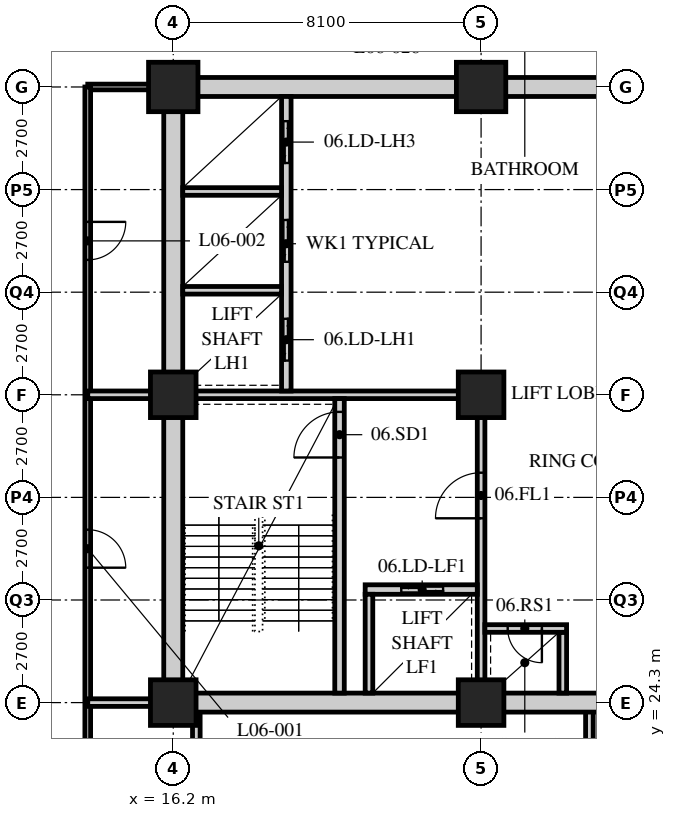
"""IFC4 building model, lengths in metres.
Left out: names, types, materials, properties, quantities, classifications, styles, units other than length and angle.
Written with IfcOpenShell. Run it as: python <this file> out.ifc"""

import sys

from ifc_helpers import new_model, si_unit, direction, frame, frame_2d, origin, origin_2d, place, context, subcontext, project, spatial, rectangle, hollow_rectangle, extrude, element, fill, save


model = new_model("IFC4")
c1 = context("Model", 3, precision=1e-05, world=origin(), true_north=direction((0.0, 1.0)))
c2 = subcontext(c1, "Body", "Model", "MODEL_VIEW")
j1 = project(units=[si_unit("LENGTHUNIT", "METRE"), si_unit("PLANEANGLEUNIT", "RADIAN")], contexts=[c1])
p1 = place(None, origin())
s1 = spatial("IfcSite", under=j1, at=p1, CompositionType="ELEMENT")
p2 = place(p1, origin())
s2 = spatial("IfcBuilding", under=s1, at=p2, CompositionType="ELEMENT")
p3 = place(p2, frame((0.0, 0.0, 33.0)))
s3 = spatial("IfcBuildingStorey", under=s2, at=p3, CompositionType="ELEMENT", Elevation=33.0)
for number, where, z_axis, x_axis in (
    (1, (16.2, 24.3, 0.0), (0.0, 0.0, 1.0), (1.0, 0.0, 0.0)),
    (2, (16.2, 32.4, 0.0), (0.0, 0.0, 1.0), (1.0, 0.0, 0.0)),
):
    element("IfcColumn", number, at=place(p3, frame(where, z_axis=z_axis, x_axis=x_axis)), inside=s3, PredefinedType="COLUMN", context=c2, shape_type="SweptSolid", body=[
        extrude(hollow_rectangle(XDim=1.2, YDim=1.2, WallThickness=0.12, at=origin_2d()), origin(), (0.0, 0.0, 1.0), 3.4),
    ])
p4 = place(p3, frame((16.2, 40.5, 0.0), z_axis=(0.0, 0.0, 1.0), x_axis=(1.0, 0.0, 0.0)))
e3 = element("IfcColumn", 3, at=p4, inside=s3, PredefinedType="COLUMN", context=c2, shape_type="SweptSolid", body=[
    extrude(hollow_rectangle(XDim=1.3, YDim=1.3, WallThickness=0.13, at=origin_2d()), origin(), (0.0, 0.0, 1.0), 3.4),
])
for number, where, z_axis, x_axis in (
    (4, (24.3, 24.3, 0.0), (0.0, 0.0, 1.0), (1.0, 0.0, 0.0)),
    (5, (24.3, 32.4, 0.0), (0.0, 0.0, 1.0), (1.0, 0.0, 0.0)),
):
    element("IfcColumn", number, at=place(p3, frame(where, z_axis=z_axis, x_axis=x_axis)), inside=s3, PredefinedType="COLUMN", context=c2, shape_type="SweptSolid", body=[
        extrude(hollow_rectangle(XDim=1.2, YDim=1.2, WallThickness=0.12, at=origin_2d()), origin(), (0.0, 0.0, 1.0), 3.4),
    ])
p5 = place(p3, frame((24.3, 40.5, 0.0), z_axis=(0.0, 0.0, 1.0), x_axis=(1.0, 0.0, 0.0)))
e6 = element("IfcColumn", 6, at=p5, inside=s3, PredefinedType="COLUMN", context=c2, shape_type="SweptSolid", body=[
    extrude(hollow_rectangle(XDim=1.3, YDim=1.3, WallThickness=0.13, at=origin_2d()), origin(), (0.0, 0.0, 1.0), 3.4),
])
p6 = place(p3, frame((16.0, 40.5, 0.0), z_axis=(0.0, 0.0, 1.0), x_axis=(-1.0, 0.0, 0.0)))
e7 = element("IfcWall", 7, at=p6, inside=s3, PredefinedType="PARTITIONING", context=c2, shape_type="SweptSolid", body=[
    extrude(rectangle(XDim=2.05, YDim=0.15, at=frame_2d((1.025, 0.0))), origin(), (0.0, 0.0, 1.0), 2.578),
])
p7 = place(p3, frame((13.95, 40.5, 0.0), z_axis=(0.0, 0.0, 1.0), x_axis=(0.0, -1.0, 0.0)))
e8 = element("IfcWall", 8, at=p7, inside=s3, PredefinedType="PARTITIONING", context=c2, shape_type="SweptSolid", body=[
    extrude(rectangle(XDim=22.5, YDim=0.15, at=frame_2d((11.25, 0.0))), origin(), (0.0, 0.0, 1.0), 3.19),
])
p8 = place(p7, frame((11.65, 0.0, 0.0)))
e9 = element("IfcOpeningElement", 9, at=p8, cuts=e8, PredefinedType="OPENING", context=c2, shape_type="SweptSolid", body=[
    extrude(rectangle(XDim=1.0, YDim=2.1, at=frame_2d((0.5, 1.05))), frame((0.0, 0.085, 0.0), z_axis=(0.0, -1.0, 0.0), x_axis=(1.0, 0.0, 0.0)), (0.0, 0.0, 1.0), 0.17),
])
p9 = place(p7, frame((3.55, 0.0, 0.0)))
e10 = element("IfcOpeningElement", 10, at=p9, cuts=e8, PredefinedType="OPENING", context=c2, shape_type="SweptSolid", body=[
    extrude(rectangle(XDim=1.0, YDim=2.1, at=frame_2d((0.5, 1.05))), frame((0.0, 0.085, 0.0), z_axis=(0.0, -1.0, 0.0), x_axis=(1.0, 0.0, 0.0)), (0.0, 0.0, 1.0), 0.17),
])
p10 = place(p3, frame((13.95, 32.4, 0.0), z_axis=(0.0, 0.0, 1.0), x_axis=(1.0, 0.0, 0.0)))
e11 = element("IfcWall", 11, at=p10, inside=s3, PredefinedType="SOLIDWALL", context=c2, shape_type="SweptSolid", body=[
    extrude(rectangle(XDim=2.25, YDim=0.2, at=frame_2d((1.125, 0.0))), origin(), (0.0, 0.0, 1.0), 2.578),
])
for number, where, z_axis, x_axis in (
    (12, (16.807, 18.0, 0.0), (0.0, 0.0, 1.0), (0.0, 1.0, 0.0)),
    (13, (27.15, 18.0, 0.0), (0.0, 0.0, 1.0), (0.0, 1.0, 0.0)),
):
    element("IfcWall", number, at=place(p3, frame(where, z_axis=z_axis, x_axis=x_axis)), inside=s3, PredefinedType="SOLIDWALL", context=c2, shape_type="SweptSolid", body=[
        extrude(rectangle(XDim=6.3, YDim=0.2, at=frame_2d((3.15, 0.0))), origin(), (0.0, 0.0, 1.0), 3.19),
    ])
p11 = place(p3, frame((13.95, 24.3, 0.0), z_axis=(0.0, 0.0, 1.0), x_axis=(1.0, 0.0, 0.0)))
e14 = element("IfcWall", 14, at=p11, inside=s3, PredefinedType="SOLIDWALL", context=c2, shape_type="SweptSolid", body=[
    extrude(rectangle(XDim=2.25, YDim=0.2, at=frame_2d((1.125, 0.0))), origin(), (0.0, 0.0, 1.0), 2.578),
])
p12 = place(p3, frame((15.95, 24.3, 0.0), z_axis=(0.0, 0.0, 1.0), x_axis=(1.0, 0.0, 0.0)))
e15 = element("IfcWall", 15, at=p12, inside=s3, PredefinedType="SOLIDWALL", context=c2, shape_type="SweptSolid", body=[
    extrude(rectangle(XDim=24.8, YDim=0.5, at=frame_2d((12.4, 0.0))), origin(), (0.0, 0.0, 1.0), 2.54),
])
p13 = place(p12, frame((11.5, 0.0, 0.0)))
e16 = element("IfcOpeningElement", 16, at=p13, cuts=e15, PredefinedType="OPENING", context=c2, shape_type="SweptSolid", body=[
    extrude(rectangle(XDim=1.8, YDim=2.4, at=frame_2d((0.9, 1.2))), frame((0.0, 0.26, 0.0), z_axis=(0.0, -1.0, 0.0), x_axis=(1.0, 0.0, 0.0)), (0.0, 0.0, 1.0), 0.52),
])
p14 = place(p3, frame((15.95, 40.5, 0.0), z_axis=(0.0, 0.0, 1.0), x_axis=(1.0, 0.0, 0.0)))
e17 = element("IfcWall", 17, at=p14, inside=s3, PredefinedType="SOLIDWALL", context=c2, shape_type="SweptSolid", body=[
    extrude(rectangle(XDim=24.8, YDim=0.5, at=frame_2d((12.4, 0.0))), origin(), (0.0, 0.0, 1.0), 2.54),
])
p15 = place(p14, frame((11.5, 0.0, 0.0)))
e18 = element("IfcOpeningElement", 18, at=p15, cuts=e17, PredefinedType="OPENING", context=c2, shape_type="SweptSolid", body=[
    extrude(rectangle(XDim=1.8, YDim=2.4, at=frame_2d((0.9, 1.2))), frame((0.0, 0.26, 0.0), z_axis=(0.0, -1.0, 0.0), x_axis=(1.0, 0.0, 0.0)), (0.0, 0.0, 1.0), 0.52),
])
p16 = place(p3, frame((16.2, 24.55, 0.0), z_axis=(0.0, 0.0, 1.0), x_axis=(0.0, 1.0, 0.0)))
e19 = element("IfcWall", 19, at=p16, inside=s3, PredefinedType="SOLIDWALL", context=c2, shape_type="SweptSolid", body=[
    extrude(rectangle(XDim=15.7, YDim=0.5, at=frame_2d((7.85, 0.0))), origin(), (0.0, 0.0, 1.0), 2.578),
])
p17 = place(p3, frame((16.45, 32.4, 0.0), z_axis=(0.0, 0.0, 1.0), x_axis=(1.0, 0.0, 0.0)))
e20 = element("IfcWall", 20, at=p17, inside=s3, PredefinedType="SOLIDWALL", context=c2, shape_type="SweptSolid", body=[
    extrude(rectangle(XDim=7.95, YDim=0.2, at=frame_2d((3.975, 0.0))), origin(), (0.0, 0.0, 1.0), 2.578),
])
p18 = place(p3, frame((24.3, 24.55, 0.0), z_axis=(0.0, 0.0, 1.0), x_axis=(0.0, 1.0, 0.0)))
e21 = element("IfcWall", 21, at=p18, inside=s3, PredefinedType="SOLIDWALL", context=c2, shape_type="SweptSolid", body=[
    extrude(rectangle(XDim=7.75, YDim=0.2, at=frame_2d((3.875, 0.0))), origin(), (0.0, 0.0, 1.0), 2.578),
])
p19 = place(p18, frame((4.6, 0.0, 0.0)))
e22 = element("IfcOpeningElement", 22, at=p19, cuts=e21, PredefinedType="OPENING", context=c2, shape_type="SweptSolid", body=[
    extrude(rectangle(XDim=1.2, YDim=2.1, at=frame_2d((0.6, 1.05))), frame((0.0, 0.11, 0.0), z_axis=(0.0, -1.0, 0.0), x_axis=(1.0, 0.0, 0.0)), (0.0, 0.0, 1.0), 0.22),
])
p20 = place(p3, frame((20.575, 24.55, 0.0), z_axis=(0.0, 0.0, 1.0), x_axis=(0.0, 1.0, 0.0)))
e23 = element("IfcWall", 23, at=p20, inside=s3, PredefinedType="SOLIDWALL", context=c2, shape_type="SweptSolid", body=[
    extrude(rectangle(XDim=7.75, YDim=0.25, at=frame_2d((3.875, 0.0))), origin(), (0.0, 0.0, 1.0), 3.19),
])
p21 = place(p20, frame((6.2, 0.0, 0.0)))
e24 = element("IfcOpeningElement", 24, at=p21, cuts=e23, PredefinedType="OPENING", context=c2, shape_type="SweptSolid", body=[
    extrude(rectangle(XDim=1.2, YDim=2.1, at=frame_2d((0.6, 1.05))), frame((0.0, 0.135, 0.0), z_axis=(0.0, -1.0, 0.0), x_axis=(1.0, 0.0, 0.0)), (0.0, 0.0, 1.0), 0.27),
])
p22 = place(p3, frame((21.25, 27.275, 0.0), z_axis=(0.0, 0.0, 1.0), x_axis=(1.0, 0.0, 0.0)))
e25 = element("IfcWall", 25, at=p22, inside=s3, PredefinedType="SOLIDWALL", context=c2, shape_type="SweptSolid", body=[
    extrude(rectangle(XDim=2.95, YDim=0.25, at=frame_2d((1.475, 0.0))), origin(), (0.0, 0.0, 1.0), 3.19),
])
p23 = place(p22, frame((0.95, 0.0, 0.0)))
e26 = element("IfcOpeningElement", 26, at=p23, cuts=e25, PredefinedType="OPENING", context=c2, shape_type="SweptSolid", body=[
    extrude(rectangle(XDim=1.1, YDim=2.4, at=frame_2d((0.55, 1.2))), frame((0.0, 0.135, 0.0), z_axis=(0.0, -1.0, 0.0), x_axis=(1.0, 0.0, 0.0)), (0.0, 0.0, 1.0), 0.27),
])
p24 = place(p3, frame((21.35, 24.55, 0.0), z_axis=(0.0, 0.0, 1.0), x_axis=(0.0, 1.0, 0.0)))
e27 = element("IfcWall", 27, at=p24, inside=s3, PredefinedType="SOLIDWALL", context=c2, shape_type="SweptSolid", body=[
    extrude(rectangle(XDim=2.6, YDim=0.2, at=frame_2d((1.3, 0.0))), origin(), (0.0, 0.0, 1.0), 3.19),
])
p25 = place(p3, frame((19.175, 32.5, 0.0), z_axis=(0.0, 0.0, 1.0), x_axis=(0.0, 1.0, 0.0)))
e28 = element("IfcWall", 28, at=p25, inside=s3, PredefinedType="SOLIDWALL", context=c2, shape_type="SweptSolid", body=[
    extrude(rectangle(XDim=7.75, YDim=0.25, at=frame_2d((3.875, 0.0))), origin(), (0.0, 0.0, 1.0), 3.19),
])
p26 = place(p25, frame((0.8, 0.0, 0.0)))
e29 = element("IfcOpeningElement", 29, at=p26, cuts=e28, PredefinedType="OPENING", context=c2, shape_type="SweptSolid", body=[
    extrude(rectangle(XDim=1.1, YDim=2.4, at=frame_2d((0.55, 1.2))), frame((0.0, 0.135, 0.0), z_axis=(0.0, -1.0, 0.0), x_axis=(1.0, 0.0, 0.0)), (0.0, 0.0, 1.0), 0.27),
])
p27 = place(p25, frame((3.4, 0.0, 0.0)))
e30 = element("IfcOpeningElement", 30, at=p27, cuts=e28, PredefinedType="OPENING", context=c2, shape_type="SweptSolid", body=[
    extrude(rectangle(XDim=1.1, YDim=2.4, at=frame_2d((0.55, 1.2))), frame((0.0, 0.135, 0.0), z_axis=(0.0, -1.0, 0.0), x_axis=(1.0, 0.0, 0.0)), (0.0, 0.0, 1.0), 0.27),
])
p28 = place(p25, frame((6.0, 0.0, 0.0)))
e31 = element("IfcOpeningElement", 31, at=p28, cuts=e28, PredefinedType="OPENING", context=c2, shape_type="SweptSolid", body=[
    extrude(rectangle(XDim=1.1, YDim=2.4, at=frame_2d((0.55, 1.2))), frame((0.0, 0.135, 0.0), z_axis=(0.0, -1.0, 0.0), x_axis=(1.0, 0.0, 0.0)), (0.0, 0.0, 1.0), 0.27),
])
for number, where, z_axis, x_axis in (
    (32, (16.45, 35.15, 0.0), (0.0, 0.0, 1.0), (1.0, 0.0, 0.0)),
    (33, (16.45, 37.75, 0.0), (0.0, 0.0, 1.0), (1.0, 0.0, 0.0)),
):
    element("IfcWall", number, at=place(p3, frame(where, z_axis=z_axis, x_axis=x_axis)), inside=s3, PredefinedType="SOLIDWALL", context=c2, shape_type="SweptSolid", body=[
        extrude(rectangle(XDim=2.6, YDim=0.2, at=frame_2d((1.3, 0.0))), origin(), (0.0, 0.0, 1.0), 3.19),
    ])
p29 = place(p3, frame((26.45, 24.55, 0.0), z_axis=(0.0, 0.0, 1.0), x_axis=(0.0, 1.0, 0.0)))
e34 = element("IfcWall", 34, at=p29, inside=s3, PredefinedType="SOLIDWALL", context=c2, shape_type="SweptSolid", body=[
    extrude(rectangle(XDim=1.6, YDim=0.2, at=frame_2d((0.8, 0.0))), origin(), (0.0, 0.0, 1.0), 3.19),
])
p30 = place(p3, frame((24.4, 26.25, 0.0), z_axis=(0.0, 0.0, 1.0), x_axis=(1.0, 0.0, 0.0)))
e35 = element("IfcWall", 35, at=p30, inside=s3, PredefinedType="SOLIDWALL", context=c2, shape_type="SweptSolid", body=[
    extrude(rectangle(XDim=2.15, YDim=0.2, at=frame_2d((1.075, 0.0))), origin(), (0.0, 0.0, 1.0), 3.19),
])
p31 = place(p30, frame((0.6, 0.0, 0.0)))
e36 = element("IfcOpeningElement", 36, at=p31, cuts=e35, PredefinedType="OPENING", context=c2, shape_type="SweptSolid", body=[
    extrude(rectangle(XDim=0.9, YDim=2.1, at=frame_2d((0.45, 1.05))), frame((0.0, 0.11, 0.0), z_axis=(0.0, -1.0, 0.0), x_axis=(1.0, 0.0, 0.0)), (0.0, 0.0, 1.0), 0.22),
])
p32 = place(p8, origin())
e37 = element("IfcDoor", 37, at=p32, inside=s3, OperationType="SINGLE_SWING_RIGHT", PredefinedType="DOOR", context=c2, shape_type="SweptSolid", body=[
    extrude(rectangle(XDim=1.0, YDim=2.1, at=frame_2d((0.5, 1.05))), frame((0.0, 0.025, 0.0), z_axis=(0.0, -1.0, 0.0), x_axis=(1.0, 0.0, 0.0)), (0.0, 0.0, 1.0), 0.05),
])
fill(e9, e37)
p33 = place(p9, origin())
e38 = element("IfcDoor", 38, at=p33, inside=s3, OperationType="SINGLE_SWING_LEFT", PredefinedType="DOOR", context=c2, shape_type="SweptSolid", body=[
    extrude(rectangle(XDim=1.0, YDim=2.1, at=frame_2d((0.5, 1.05))), frame((0.0, 0.025, 0.0), z_axis=(0.0, -1.0, 0.0), x_axis=(1.0, 0.0, 0.0)), (0.0, 0.0, 1.0), 0.05),
])
fill(e10, e38)
p34 = place(p21, origin())
e39 = element("IfcDoor", 39, at=p34, inside=s3, OperationType="SINGLE_SWING_LEFT", PredefinedType="DOOR", context=c2, shape_type="SweptSolid", body=[
    extrude(rectangle(XDim=1.2, YDim=2.1, at=frame_2d((0.6, 1.05))), frame((0.0, 0.025, 0.0), z_axis=(0.0, -1.0, 0.0), x_axis=(1.0, 0.0, 0.0)), (0.0, 0.0, 1.0), 0.05),
])
fill(e24, e39)
p35 = place(p19, origin())
e40 = element("IfcDoor", 40, at=p35, inside=s3, OperationType="SINGLE_SWING_LEFT", PredefinedType="DOOR", context=c2, shape_type="SweptSolid", body=[
    extrude(rectangle(XDim=1.2, YDim=2.1, at=frame_2d((0.6, 1.05))), frame((0.0, 0.025, 0.0), z_axis=(0.0, -1.0, 0.0), x_axis=(1.0, 0.0, 0.0)), (0.0, 0.0, 1.0), 0.05),
])
fill(e22, e40)
p36 = place(p31, origin())
e41 = element("IfcDoor", 41, at=p36, inside=s3, OperationType="SINGLE_SWING_LEFT", PredefinedType="DOOR", context=c2, shape_type="SweptSolid", body=[
    extrude(rectangle(XDim=0.9, YDim=2.1, at=frame_2d((0.45, 1.05))), frame((0.0, 0.025, 0.0), z_axis=(0.0, -1.0, 0.0), x_axis=(1.0, 0.0, 0.0)), (0.0, 0.0, 1.0), 0.05),
])
fill(e36, e41)
p37 = place(p26, origin())
e42 = element("IfcDoor", 42, at=p37, inside=s3, OperationType="DOUBLE_DOOR_SLIDING", PredefinedType="DOOR", context=c2, shape_type="SweptSolid", body=[
    extrude(rectangle(XDim=1.1, YDim=2.4, at=frame_2d((0.55, 1.2))), frame((0.0, 0.025, 0.0), z_axis=(0.0, -1.0, 0.0), x_axis=(1.0, 0.0, 0.0)), (0.0, 0.0, 1.0), 0.05),
])
fill(e29, e42)
p38 = place(p27, origin())
e43 = element("IfcDoor", 43, at=p38, inside=s3, OperationType="DOUBLE_DOOR_SLIDING", PredefinedType="DOOR", context=c2, shape_type="SweptSolid", body=[
    extrude(rectangle(XDim=1.1, YDim=2.4, at=frame_2d((0.55, 1.2))), frame((0.0, 0.025, 0.0), z_axis=(0.0, -1.0, 0.0), x_axis=(1.0, 0.0, 0.0)), (0.0, 0.0, 1.0), 0.05),
])
fill(e30, e43)
p39 = place(p28, origin())
e44 = element("IfcDoor", 44, at=p39, inside=s3, OperationType="DOUBLE_DOOR_SLIDING", PredefinedType="DOOR", context=c2, shape_type="SweptSolid", body=[
    extrude(rectangle(XDim=1.1, YDim=2.4, at=frame_2d((0.55, 1.2))), frame((0.0, 0.025, 0.0), z_axis=(0.0, -1.0, 0.0), x_axis=(1.0, 0.0, 0.0)), (0.0, 0.0, 1.0), 0.05),
])
fill(e31, e44)
p40 = place(p23, origin())
e45 = element("IfcDoor", 45, at=p40, inside=s3, OperationType="DOUBLE_DOOR_SLIDING", PredefinedType="DOOR", context=c2, shape_type="SweptSolid", body=[
    extrude(rectangle(XDim=1.1, YDim=2.4, at=frame_2d((0.55, 1.2))), frame((0.0, 0.025, 0.0), z_axis=(0.0, -1.0, 0.0), x_axis=(1.0, 0.0, 0.0)), (0.0, 0.0, 1.0), 0.05),
])
fill(e26, e45)
save(model, sys.argv[1])
